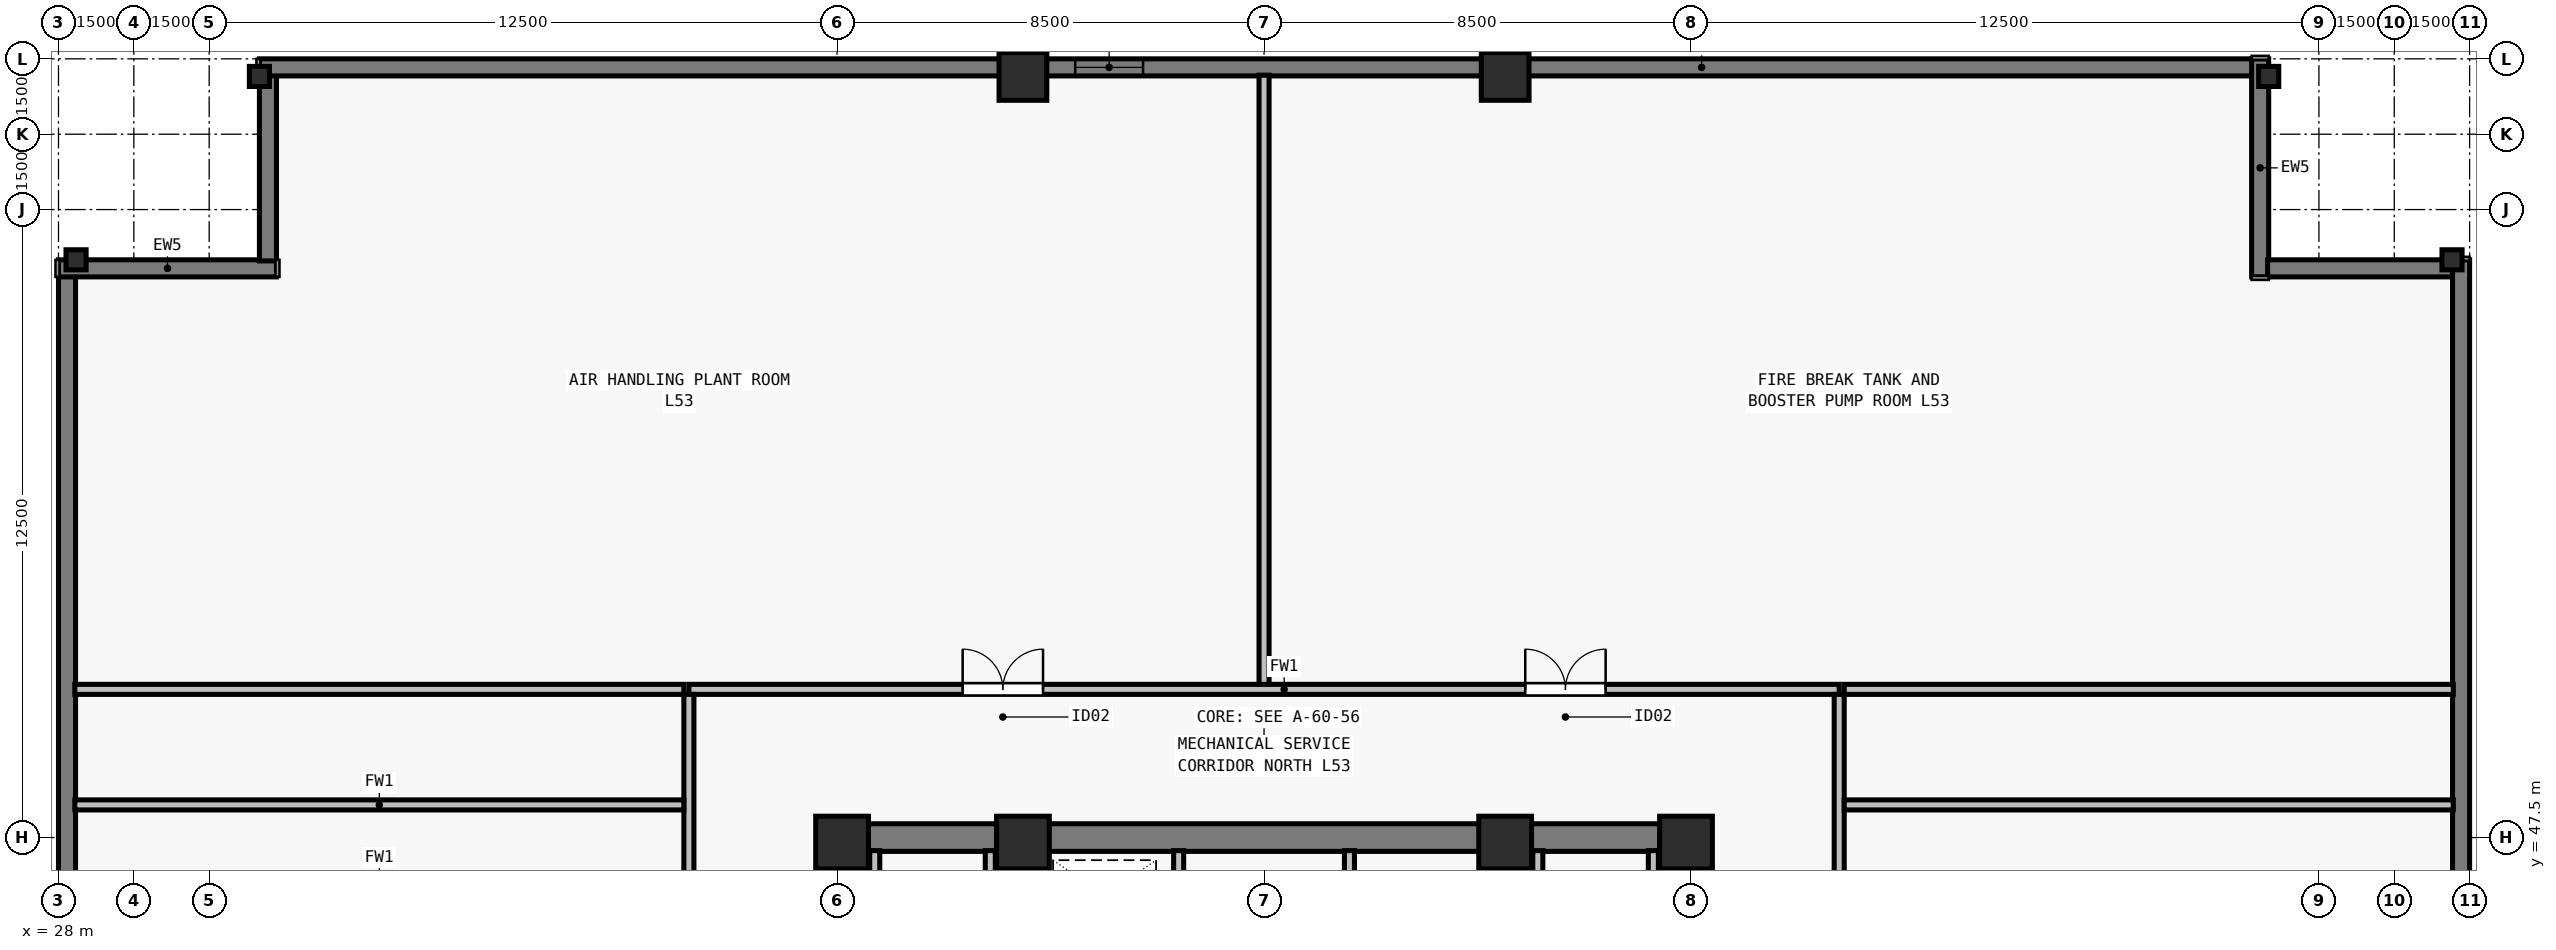
"""IFC4 building model, lengths in metres.
Left out: names, types, materials, properties, quantities, classifications, styles, units other than length and angle.
Written with IfcOpenShell. Run it as: python <this file> out.ifc"""

import sys

from ifc_helpers import new_model, si_unit, direction, frame, frame_2d, origin, origin_2d, place, context, subcontext, project, spatial, rectangle, i_section, extrude, element, fill, save


model = new_model("IFC4")
c1 = context("Model", 3, precision=1e-05, world=origin(), true_north=direction((0.0, 1.0)))
c2 = subcontext(c1, "Body", "Model", "MODEL_VIEW")
j1 = project(units=[si_unit("LENGTHUNIT", "METRE"), si_unit("PLANEANGLEUNIT", "RADIAN")], contexts=[c1])
p1 = place(None, origin())
s1 = spatial("IfcSite", under=j1, at=p1, CompositionType="ELEMENT")
p2 = place(p1, origin())
s2 = spatial("IfcBuilding", under=s1, at=p2, CompositionType="ELEMENT")
p3 = place(p2, frame((0.0, 0.0, 193.5)))
s3 = spatial("IfcBuildingStorey", under=s2, at=p3, CompositionType="ELEMENT", Elevation=193.5)
for number, where, z_axis, x_axis in (
    (1, (43.6, 47.4, 0.0), (0.0, 0.0, 1.0), (1.0, 0.0, 0.0)),
    (2, (47.2, 47.4, 0.0), (0.0, 0.0, 1.0), (1.0, 0.0, 0.0)),
    (3, (56.8, 47.4, 0.0), (0.0, 0.0, 1.0), (1.0, 0.0, 0.0)),
    (4, (60.4, 47.4, 0.0), (0.0, 0.0, 1.0), (1.0, 0.0, 0.0)),
):
    element("IfcColumn", number, at=place(p3, frame(where, z_axis=z_axis, x_axis=x_axis)), inside=s3, PredefinedType="COLUMN", context=c2, shape_type="SweptSolid", body=[
        extrude(rectangle(XDim=1.05, YDim=1.05, at=origin_2d()), origin(), (0.0, 0.0, 1.0), 4.5),
    ])
for number, where, z_axis, x_axis in (
    (5, (75.65, 59.0, 0.0), (0.0, 0.0, 1.0), (0.0, 1.0, 0.0)),
    (6, (72.0, 62.65, 0.0), (0.0, 0.0, 1.0), (1.0, 0.0, 0.0)),
):
    element("IfcColumn", number, at=place(p3, frame(where, z_axis=z_axis, x_axis=x_axis)), inside=s3, PredefinedType="COLUMN", context=c2, shape_type="SweptSolid", body=[
        extrude(i_section(OverallWidth=0.4, OverallDepth=0.4, WebThickness=0.022, FlangeThickness=0.036, at=origin_2d()), origin(), (0.0, 0.0, 1.0), 4.5),
    ])
for number, where, z_axis, x_axis in (
    (7, (56.8, 62.65, 0.0), (0.0, 0.0, 1.0), (1.0, 0.0, 0.0)),
    (8, (47.2, 62.65, 0.0), (0.0, 0.0, 1.0), (1.0, 0.0, 0.0)),
):
    element("IfcColumn", number, at=place(p3, frame(where, z_axis=z_axis, x_axis=x_axis)), inside=s3, PredefinedType="COLUMN", context=c2, shape_type="SweptSolid", body=[
        extrude(rectangle(XDim=0.95, YDim=0.95, at=origin_2d()), origin(), (0.0, 0.0, 1.0), 4.5),
    ])
for number, where, z_axis, x_axis in (
    (9, (32.0, 62.65, 0.0), (0.0, 0.0, 1.0), (1.0, 0.0, 0.0)),
    (10, (28.35, 59.0, 0.0), (0.0, 0.0, 1.0), (0.0, 1.0, 0.0)),
):
    element("IfcColumn", number, at=place(p3, frame(where, z_axis=z_axis, x_axis=x_axis)), inside=s3, PredefinedType="COLUMN", context=c2, shape_type="SweptSolid", body=[
        extrude(i_section(OverallWidth=0.4, OverallDepth=0.4, WebThickness=0.022, FlangeThickness=0.036, at=origin_2d()), origin(), (0.0, 0.0, 1.0), 4.5),
    ])
p4 = place(p3, frame((28.17, 19.0, 0.0), z_axis=(0.0, 0.0, 1.0), x_axis=(0.0, 1.0, 0.0)))
e11 = element("IfcWall", 11, at=p4, inside=s3, PredefinedType="SOLIDWALL", context=c2, shape_type="SweptSolid", body=[
    extrude(rectangle(XDim=39.682, YDim=0.34, at=frame_2d((19.841, 0.0))), origin(), (0.0, 0.0, 1.0), 4.29),
])
p5 = place(p3, frame((28.0, 58.83, 0.0), z_axis=(0.0, 0.0, 1.0), x_axis=(1.0, 0.0, 0.0)))
e12 = element("IfcWall", 12, at=p5, inside=s3, PredefinedType="SOLIDWALL", context=c2, shape_type="SweptSolid", body=[
    extrude(rectangle(XDim=4.34, YDim=0.34, at=frame_2d((2.17, 0.0))), origin(), (0.0, 0.0, 1.0), 4.29),
])
p6 = place(p3, frame((32.17, 58.978, 0.0), z_axis=(0.0, 0.0, 1.0), x_axis=(0.0, 1.0, 0.0)))
e13 = element("IfcWall", 13, at=p6, inside=s3, PredefinedType="SOLIDWALL", context=c2, shape_type="SweptSolid", body=[
    extrude(rectangle(XDim=3.704, YDim=0.34, at=frame_2d((1.852, 0.0))), origin(), (0.0, 0.0, 1.0), 4.29),
])
p7 = place(p3, frame((32.0, 62.83, 0.0), z_axis=(0.0, 0.0, 1.0), x_axis=(1.0, 0.0, 0.0)))
e14 = element("IfcWall", 14, at=p7, inside=s3, PredefinedType="SOLIDWALL", context=c2, shape_type="SweptSolid", body=[
    extrude(rectangle(XDim=39.682, YDim=0.34, at=frame_2d((19.841, 0.0))), origin(), (0.0, 0.0, 1.0), 4.29),
])
p8 = place(p7, frame((16.241, 0.0, 0.8)))
e15 = element("IfcOpeningElement", 15, at=p8, cuts=e14, PredefinedType="OPENING", context=c2, shape_type="SweptSolid", body=[
    extrude(rectangle(XDim=1.35, YDim=1.54, at=frame_2d((0.675, 0.77))), frame((0.0, 0.18, 0.0), z_axis=(0.0, -1.0, 0.0), x_axis=(1.0, 0.0, 0.0)), (0.0, 0.0, 1.0), 0.36),
])
p9 = place(p3, frame((71.83, 63.0, 0.0), z_axis=(0.0, 0.0, 1.0), x_axis=(0.0, -1.0, 0.0)))
e16 = element("IfcWall", 16, at=p9, inside=s3, PredefinedType="SOLIDWALL", context=c2, shape_type="SweptSolid", body=[
    extrude(rectangle(XDim=4.34, YDim=0.34, at=frame_2d((2.17, 0.0))), origin(), (0.0, 0.0, 1.0), 4.29),
])
p10 = place(p3, frame((71.978, 58.83, 0.0), z_axis=(0.0, 0.0, 1.0), x_axis=(1.0, 0.0, 0.0)))
e17 = element("IfcWall", 17, at=p10, inside=s3, PredefinedType="SOLIDWALL", context=c2, shape_type="SweptSolid", body=[
    extrude(rectangle(XDim=3.704, YDim=0.34, at=frame_2d((1.852, 0.0))), origin(), (0.0, 0.0, 1.0), 4.29),
])
p11 = place(p3, frame((75.83, 59.0, 0.0), z_axis=(0.0, 0.0, 1.0), x_axis=(0.0, -1.0, 0.0)))
e18 = element("IfcWall", 18, at=p11, inside=s3, PredefinedType="SOLIDWALL", context=c2, shape_type="SweptSolid", body=[
    extrude(rectangle(XDim=39.682, YDim=0.34, at=frame_2d((19.841, 0.0))), origin(), (0.0, 0.0, 1.0), 4.29),
])
p12 = place(p3, frame((43.225, 47.5, 0.0), z_axis=(0.0, 0.0, 1.0), x_axis=(1.0, 0.0, 0.0)))
e19 = element("IfcWall", 19, at=p12, inside=s3, PredefinedType="SHEAR", context=c2, shape_type="SweptSolid", body=[
    extrude(rectangle(XDim=17.55, YDim=0.55, at=frame_2d((8.775, 0.0))), origin(), (0.0, 0.0, 1.0), 4.29),
])
for number, where, z_axis, x_axis in (
    (20, (43.5, 40.8, 0.0), (0.0, 0.0, 1.0), (0.0, 1.0, 0.0)),
    (21, (60.5, 40.8, 0.0), (0.0, 0.0, 1.0), (0.0, 1.0, 0.0)),
):
    element("IfcWall", number, at=place(p3, frame(where, z_axis=z_axis, x_axis=x_axis)), inside=s3, PredefinedType="SHEAR", context=c2, shape_type="SweptSolid", body=[
        extrude(rectangle(XDim=6.435, YDim=0.55, at=frame_2d((3.218, 0.0))), origin(), (0.0, 0.0, 1.0), 4.29),
    ])
p13 = place(p3, frame((50.3, 40.585, 0.0), z_axis=(0.0, 0.0, 1.0), x_axis=(0.0, 1.0, 0.0)))
e22 = element("IfcWall", 22, at=p13, inside=s3, PredefinedType="SOLIDWALL", context=c2, shape_type="SweptSolid", body=[
    extrude(rectangle(XDim=6.655, YDim=0.2, at=frame_2d((3.328, 0.0))), origin(), (0.0, 0.0, 1.0), 4.29),
])
p14 = place(p13, frame((5.065, 0.0, 0.0)))
e23 = element("IfcOpeningElement", 23, at=p14, cuts=e22, PredefinedType="OPENING", context=c2, shape_type="SweptSolid", body=[
    extrude(rectangle(XDim=0.8, YDim=2.08, at=frame_2d((0.4, 1.04))), frame((0.0, 0.11, 0.0), z_axis=(0.0, -1.0, 0.0), x_axis=(1.0, 0.0, 0.0)), (0.0, 0.0, 1.0), 0.22),
])
p15 = place(p3, frame((53.7, 40.585, 0.0), z_axis=(0.0, 0.0, 1.0), x_axis=(0.0, 1.0, 0.0)))
e24 = element("IfcWall", 24, at=p15, inside=s3, PredefinedType="SOLIDWALL", context=c2, shape_type="SweptSolid", body=[
    extrude(rectangle(XDim=6.655, YDim=0.2, at=frame_2d((3.328, 0.0))), origin(), (0.0, 0.0, 1.0), 4.29),
])
p16 = place(p15, frame((0.195, 0.0, 0.0)))
e25 = element("IfcOpeningElement", 25, at=p16, cuts=e24, PredefinedType="OPENING", context=c2, shape_type="SweptSolid", body=[
    extrude(rectangle(XDim=0.8, YDim=2.08, at=frame_2d((0.4, 1.04))), frame((0.0, 0.11, 0.0), z_axis=(0.0, -1.0, 0.0), x_axis=(1.0, 0.0, 0.0)), (0.0, 0.0, 1.0), 0.22),
])
p17 = place(p15, frame((4.265, 0.0, 0.0)))
e26 = element("IfcOpeningElement", 26, at=p17, cuts=e24, PredefinedType="OPENING", context=c2, shape_type="SweptSolid", body=[
    extrude(rectangle(XDim=0.95, YDim=2.12, at=frame_2d((0.475, 1.06))), frame((0.0, 0.11, 0.0), z_axis=(0.0, -1.0, 0.0), x_axis=(1.0, 0.0, 0.0)), (0.0, 0.0, 1.0), 0.22),
])
for number, where, z_axis, x_axis in (
    (27, (46.55, 43.735, 0.0), (0.0, 0.0, 1.0), (0.0, 1.0, 0.0)),
    (28, (44.25, 43.735, 0.0), (0.0, 0.0, 1.0), (0.0, 1.0, 0.0)),
    (29, (57.45, 43.735, 0.0), (0.0, 0.0, 1.0), (0.0, 1.0, 0.0)),
    (30, (59.75, 43.735, 0.0), (0.0, 0.0, 1.0), (0.0, 1.0, 0.0)),
):
    element("IfcWall", number, at=place(p3, frame(where, z_axis=z_axis, x_axis=x_axis)), inside=s3, PredefinedType="SOLIDWALL", context=c2, shape_type="SweptSolid", body=[
        extrude(rectangle(XDim=3.505, YDim=0.2, at=frame_2d((1.752, 0.0))), origin(), (0.0, 0.0, 1.0), 4.29),
    ])
for number, where, z_axis, x_axis in (
    (31, (47.35, 43.735, 0.0), (0.0, 0.0, 1.0), (0.0, 1.0, 0.0)),
    (32, (56.65, 43.735, 0.0), (0.0, 0.0, 1.0), (0.0, 1.0, 0.0)),
):
    element("IfcWall", number, at=place(p3, frame(where, z_axis=z_axis, x_axis=x_axis)), inside=s3, PredefinedType="SOLIDWALL", context=c2, shape_type="SweptSolid", body=[
        extrude(rectangle(XDim=3.505, YDim=0.18, at=frame_2d((1.752, 0.0))), origin(), (0.0, 0.0, 1.0), 4.29),
    ])
p18 = place(p3, frame((40.55, 50.45, 0.0), z_axis=(0.0, 0.0, 1.0), x_axis=(1.0, 0.0, 0.0)))
e33 = element("IfcWall", 33, at=p18, inside=s3, PredefinedType="SOLIDWALL", context=c2, shape_type="SweptSolid", body=[
    extrude(rectangle(XDim=22.9, YDim=0.2, at=frame_2d((11.45, 0.0))), origin(), (0.0, 0.0, 1.0), 4.29),
])
p19 = place(p18, frame((5.45, 0.0, 0.0)))
e34 = element("IfcOpeningElement", 34, at=p19, cuts=e33, PredefinedType="OPENING", context=c2, shape_type="SweptSolid", body=[
    extrude(rectangle(XDim=1.6, YDim=2.2, at=frame_2d((0.8, 1.1))), frame((0.0, 0.11, 0.0), z_axis=(0.0, -1.0, 0.0), x_axis=(1.0, 0.0, 0.0)), (0.0, 0.0, 1.0), 0.22),
])
p20 = place(p18, frame((16.65, 0.0, 0.0)))
e35 = element("IfcOpeningElement", 35, at=p20, cuts=e33, PredefinedType="OPENING", context=c2, shape_type="SweptSolid", body=[
    extrude(rectangle(XDim=1.6, YDim=2.2, at=frame_2d((0.8, 1.1))), frame((0.0, 0.11, 0.0), z_axis=(0.0, -1.0, 0.0), x_axis=(1.0, 0.0, 0.0)), (0.0, 0.0, 1.0), 0.22),
])
p21 = place(p3, frame((40.55, 27.65, 0.0), z_axis=(0.0, 0.0, 1.0), x_axis=(0.0, 1.0, 0.0)))
e36 = element("IfcWall", 36, at=p21, inside=s3, PredefinedType="SOLIDWALL", context=c2, shape_type="SweptSolid", body=[
    extrude(rectangle(XDim=22.7, YDim=0.2, at=frame_2d((11.35, 0.0))), origin(), (0.0, 0.0, 1.0), 4.29),
])
p22 = place(p21, frame((9.2, 0.0, 0.0)))
e37 = element("IfcOpeningElement", 37, at=p22, cuts=e36, PredefinedType="OPENING", context=c2, shape_type="SweptSolid", body=[
    extrude(rectangle(XDim=1.6, YDim=2.2, at=frame_2d((0.8, 1.1))), frame((0.0, 0.11, 0.0), z_axis=(0.0, -1.0, 0.0), x_axis=(1.0, 0.0, 0.0)), (0.0, 0.0, 1.0), 0.22),
])
p23 = place(p3, frame((63.45, 27.65, 0.0), z_axis=(0.0, 0.0, 1.0), x_axis=(0.0, 1.0, 0.0)))
e38 = element("IfcWall", 38, at=p23, inside=s3, PredefinedType="SOLIDWALL", context=c2, shape_type="SweptSolid", body=[
    extrude(rectangle(XDim=22.7, YDim=0.2, at=frame_2d((11.35, 0.0))), origin(), (0.0, 0.0, 1.0), 4.29),
])
p24 = place(p23, frame((9.2, 0.0, 0.0)))
e39 = element("IfcOpeningElement", 39, at=p24, cuts=e38, PredefinedType="OPENING", context=c2, shape_type="SweptSolid", body=[
    extrude(rectangle(XDim=1.6, YDim=2.2, at=frame_2d((0.8, 1.1))), frame((0.0, 0.11, 0.0), z_axis=(0.0, -1.0, 0.0), x_axis=(1.0, 0.0, 0.0)), (0.0, 0.0, 1.0), 0.22),
])
for number, where, z_axis, x_axis in (
    (40, (28.325, 48.15, 0.0), (0.0, 0.0, 1.0), (1.0, 0.0, 0.0)),
    (41, (63.55, 48.15, 0.0), (0.0, 0.0, 1.0), (1.0, 0.0, 0.0)),
):
    element("IfcWall", number, at=place(p3, frame(where, z_axis=z_axis, x_axis=x_axis)), inside=s3, PredefinedType="SOLIDWALL", context=c2, shape_type="SweptSolid", body=[
        extrude(rectangle(XDim=12.125, YDim=0.2, at=frame_2d((6.062, 0.0))), origin(), (0.0, 0.0, 1.0), 4.29),
    ])
for number, where, z_axis, x_axis in (
    (42, (52.0, 50.55, 0.0), (0.0, 0.0, 1.0), (0.0, 1.0, 0.0)),
    (43, (28.325, 50.45, 0.0), (0.0, 0.0, 1.0), (1.0, 0.0, 0.0)),
    (44, (63.55, 50.45, 0.0), (0.0, 0.0, 1.0), (1.0, 0.0, 0.0)),
):
    element("IfcWall", number, at=place(p3, frame(where, z_axis=z_axis, x_axis=x_axis)), inside=s3, PredefinedType="SOLIDWALL", context=c2, shape_type="SweptSolid", body=[
        extrude(rectangle(XDim=12.125, YDim=0.2, at=frame_2d((6.062, 0.0))), origin(), (0.0, 0.0, 1.0), 3.906),
    ])
p25 = place(p8, origin())
e45 = element("IfcWindow", 45, at=p25, inside=s3, PartitioningType="SINGLE_PANEL", PredefinedType="WINDOW", context=c2, shape_type="SweptSolid", body=[
    extrude(rectangle(XDim=1.35, YDim=1.54, at=frame_2d((0.675, 0.77))), frame((0.0, -0.04, 0.0), z_axis=(0.0, -1.0, 0.0), x_axis=(1.0, 0.0, 0.0)), (0.0, 0.0, 1.0), 0.06),
])
fill(e15, e45)
p26 = place(p19, origin())
e46 = element("IfcDoor", 46, at=p26, inside=s3, OperationType="DOUBLE_DOOR_SINGLE_SWING", PredefinedType="DOOR", context=c2, shape_type="SweptSolid", body=[
    extrude(rectangle(XDim=1.6, YDim=2.2, at=frame_2d((0.8, 1.1))), frame((0.0, 0.025, 0.0), z_axis=(0.0, -1.0, 0.0), x_axis=(1.0, 0.0, 0.0)), (0.0, 0.0, 1.0), 0.05),
])
fill(e34, e46)
p27 = place(p20, origin())
e47 = element("IfcDoor", 47, at=p27, inside=s3, OperationType="DOUBLE_DOOR_SINGLE_SWING", PredefinedType="DOOR", context=c2, shape_type="SweptSolid", body=[
    extrude(rectangle(XDim=1.6, YDim=2.2, at=frame_2d((0.8, 1.1))), frame((0.0, 0.025, 0.0), z_axis=(0.0, -1.0, 0.0), x_axis=(1.0, 0.0, 0.0)), (0.0, 0.0, 1.0), 0.05),
])
fill(e35, e47)
save(model, sys.argv[1])
